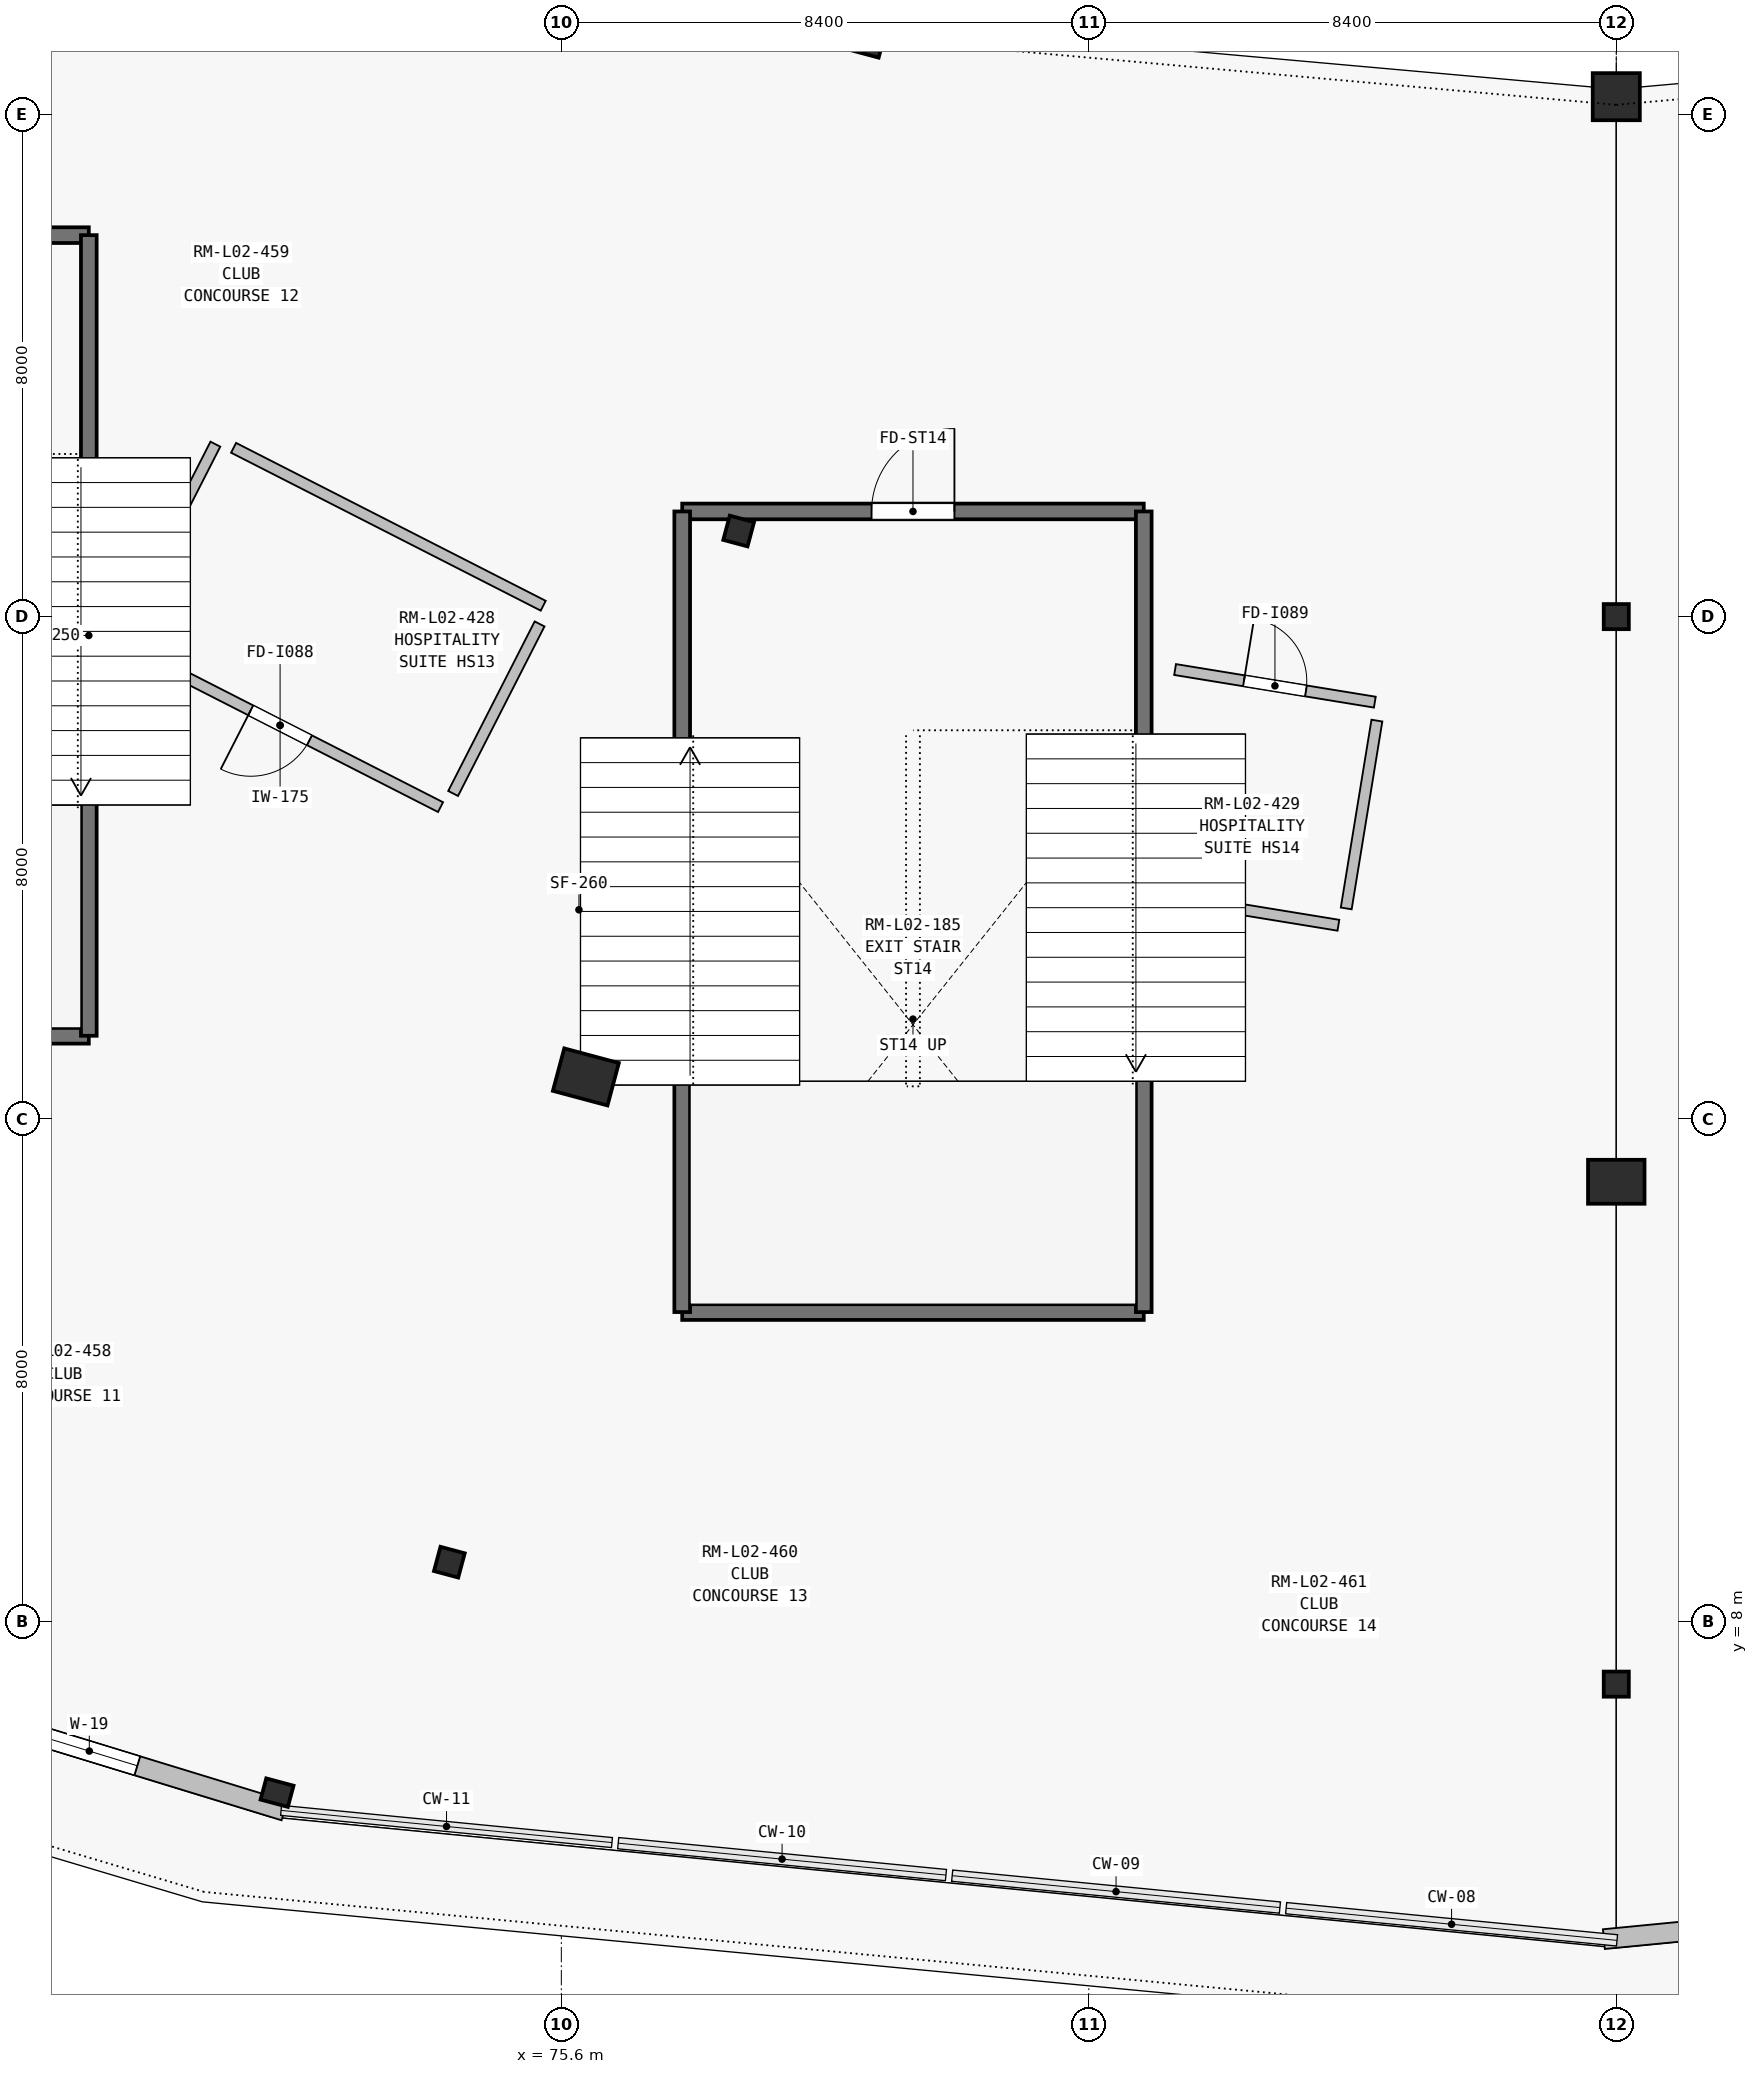
"""IFC4 building model, lengths in metres.
Left out: names, types, materials, properties, quantities, classifications, styles, units other than length and angle.
Written with IfcOpenShell. Run it as: python <this file> out.ifc"""

import sys

from ifc_helpers import new_model, si_unit, direction, frame, frame_2d, origin, origin_2d, place, context, subcontext, project, spatial, rectangle, i_section, extrude, element, fill, save


model = new_model("IFC4")
c1 = context("Model", 3, precision=1e-05, world=origin(), true_north=direction((0.0, 1.0)))
c2 = subcontext(c1, "Body", "Model", "MODEL_VIEW")
j1 = project(units=[si_unit("LENGTHUNIT", "METRE"), si_unit("PLANEANGLEUNIT", "RADIAN")], contexts=[c1])
p1 = place(None, origin())
s1 = spatial("IfcSite", under=j1, at=p1, CompositionType="ELEMENT")
p2 = place(p1, origin())
s2 = spatial("IfcBuilding", under=s1, at=p2, CompositionType="ELEMENT")
p3 = place(p2, frame((0.0, 0.0, 9.9)))
s3 = spatial("IfcBuildingStorey", under=s2, at=p3, CompositionType="ELEMENT", Elevation=9.9)
for number, where, z_axis, x_axis in (
    (1, (78.424, 25.363, 0.0), (0.0, 0.0, 1.0), (-0.259, -0.966, 0.0)),
    (2, (92.4, 24.0, 0.0), (0.0, 0.0, 1.0), (0.0, -1.0, 0.0)),
):
    element("IfcColumn", number, at=place(p3, frame(where, z_axis=z_axis, x_axis=x_axis)), inside=s3, PredefinedType="COLUMN", context=c2, shape_type="SweptSolid", body=[
        extrude(i_section(OverallWidth=0.4, OverallDepth=0.4, WebThickness=0.018, FlangeThickness=0.032, at=origin_2d()), origin(), (0.0, 0.0, 1.0), 4.5),
    ])
p4 = place(p3, frame((80.388, 33.361, 0.0), z_axis=(0.0, 0.0, 1.0), x_axis=(-0.258819045103, -0.965925826289, 0.0)))
e3 = element("IfcColumn", 3, at=p4, inside=s3, PredefinedType="COLUMN", context=c2, shape_type="SweptSolid", body=[
    extrude(rectangle(XDim=0.75, YDim=0.75, at=origin_2d()), origin(), (0.0, 0.0, 1.0), 3.553),
])
p5 = place(p3, frame((92.4, 32.28, 0.0), z_axis=(0.0, 0.0, 1.0), x_axis=(0.0, -1.0, 0.0)))
e4 = element("IfcColumn", 4, at=p5, inside=s3, PredefinedType="COLUMN", context=c2, shape_type="SweptSolid", body=[
    extrude(rectangle(XDim=0.75, YDim=0.75, at=origin_2d()), origin(), (0.0, 0.0, 1.0), 3.554),
])
for number, where, z_axis, x_axis in (
    (5, (75.991, 16.67, 0.0), (0.0, 0.0, 1.0), (-0.259, -0.966, 0.0)),
    (6, (92.4, 15.0, 0.0), (0.0, 0.0, 1.0), (0.0, -1.0, 0.0)),
):
    element("IfcColumn", number, at=place(p3, frame(where, z_axis=z_axis, x_axis=x_axis)), inside=s3, PredefinedType="COLUMN", context=c2, shape_type="SweptSolid", body=[
        extrude(rectangle(XDim=0.7, YDim=0.9, at=origin_2d()), origin(), (0.0, 0.0, 1.0), 4.5),
    ])
for number, where, z_axis, x_axis in (
    (7, (73.817, 8.942, 0.0), (0.0, 0.0, 1.0), (-0.259, -0.966, 0.0)),
    (8, (92.4, 7.0, 0.0), (0.0, 0.0, 1.0), (0.0, -1.0, 0.0)),
):
    element("IfcColumn", number, at=place(p3, frame(where, z_axis=z_axis, x_axis=x_axis)), inside=s3, PredefinedType="COLUMN", context=c2, shape_type="SweptSolid", body=[
        extrude(i_section(OverallWidth=0.4, OverallDepth=0.4, WebThickness=0.016, FlangeThickness=0.028, at=origin_2d()), origin(), (0.0, 0.0, 1.0), 4.5),
    ])
p6 = place(p3, frame((71.073, 5.272, 0.0), z_axis=(0.0, 0.0, 1.0), x_axis=(-0.258819045103, -0.965925826289, 0.0)))
e9 = element("IfcColumn", 9, at=p6, inside=s3, PredefinedType="PILASTER", context=c2, shape_type="SweptSolid", body=[
    extrude(rectangle(XDim=0.35, YDim=0.45, at=origin_2d()), origin(), (0.0, 0.0, 1.0), 5.45),
])
p7 = place(p3, frame((113.997, 5.06, 0.0), z_axis=(0.0, 0.0, 1.0), x_axis=(-0.995299462798, -0.096845130773, 0.0)))
e10 = element("IfcWall", 10, at=p7, inside=s3, PredefinedType="SOLIDWALL", context=c2, shape_type="SweptSolid", body=[
    extrude(rectangle(XDim=21.897, YDim=0.315, at=frame_2d((10.948, 0.0))), origin(), (0.0, 0.0, 1.0), 4.265),
])
p8 = place(p7, frame((1.596, 0.0, 0.0)))
e11 = element("IfcOpeningElement", 11, at=p8, cuts=e10, PredefinedType="OPENING", context=c2, shape_type="SweptSolid", body=[
    extrude(rectangle(XDim=1.95, YDim=2.35, at=frame_2d((0.975, 1.175))), frame((0.0, 0.167, 0.0), z_axis=(0.0, -1.0, 0.0), x_axis=(1.0, 0.0, 0.0)), (0.0, 0.0, 1.0), 0.335),
])
p9 = place(p7, frame((7.375, 0.0, 0.75)))
e12 = element("IfcOpeningElement", 12, at=p9, cuts=e10, PredefinedType="OPENING", context=c2, shape_type="SweptSolid", body=[
    extrude(rectangle(XDim=0.95, YDim=2.2, at=frame_2d((0.475, 1.1))), frame((0.0, 0.167, 0.0), z_axis=(0.0, -1.0, 0.0), x_axis=(1.0, 0.0, 0.0)), (0.0, 0.0, 1.0), 0.335),
])
p10 = place(p7, frame((11.65, 0.0, 0.9)))
e13 = element("IfcOpeningElement", 13, at=p10, cuts=e10, PredefinedType="OPENING", context=c2, shape_type="SweptSolid", body=[
    extrude(rectangle(XDim=1.6, YDim=1.45, at=frame_2d((0.8, 0.725))), frame((0.0, 0.167, 0.0), z_axis=(0.0, -1.0, 0.0), x_axis=(1.0, 0.0, 0.0)), (0.0, 0.0, 1.0), 0.335),
])
p11 = place(p7, frame((16.15, 0.0, 0.75)))
e14 = element("IfcOpeningElement", 14, at=p11, cuts=e10, PredefinedType="OPENING", context=c2, shape_type="SweptSolid", body=[
    extrude(rectangle(XDim=1.8, YDim=2.4, at=frame_2d((0.9, 1.2))), frame((0.0, 0.167, 0.0), z_axis=(0.0, -1.0, 0.0), x_axis=(1.0, 0.0, 0.0)), (0.0, 0.0, 1.0), 0.335),
])
p12 = place(p3, frame((71.191, 4.982, 0.0), z_axis=(0.0, 0.0, 1.0), x_axis=(-0.956190176803, 0.292746213956, 0.0)))
e15 = element("IfcWall", 15, at=p12, inside=s3, PredefinedType="SOLIDWALL", context=c2, shape_type="SweptSolid", body=[
    extrude(rectangle(XDim=21.25, YDim=0.315, at=frame_2d((10.625, 0.0))), origin(), (0.0, 0.0, 1.0), 4.265),
])
p13 = place(p12, frame((2.45, 0.0, 0.9)))
e16 = element("IfcOpeningElement", 16, at=p13, cuts=e15, PredefinedType="OPENING", context=c2, shape_type="SweptSolid", body=[
    extrude(rectangle(XDim=1.6, YDim=1.45, at=frame_2d((0.8, 0.725))), frame((0.0, 0.167, 0.0), z_axis=(0.0, -1.0, 0.0), x_axis=(1.0, 0.0, 0.0)), (0.0, 0.0, 1.0), 0.335),
])
p14 = place(p12, frame((6.95, 0.0, 0.75)))
e17 = element("IfcOpeningElement", 17, at=p14, cuts=e15, PredefinedType="OPENING", context=c2, shape_type="SweptSolid", body=[
    extrude(rectangle(XDim=1.8, YDim=2.4, at=frame_2d((0.9, 1.2))), frame((0.0, 0.167, 0.0), z_axis=(0.0, -1.0, 0.0), x_axis=(1.0, 0.0, 0.0)), (0.0, 0.0, 1.0), 0.335),
])
p15 = place(p12, frame((11.7, 0.0, 0.75)))
e18 = element("IfcOpeningElement", 18, at=p15, cuts=e15, PredefinedType="OPENING", context=c2, shape_type="SweptSolid", body=[
    extrude(rectangle(XDim=1.5, YDim=2.3, at=frame_2d((0.75, 1.15))), frame((0.0, 0.167, 0.0), z_axis=(0.0, -1.0, 0.0), x_axis=(1.0, 0.0, 0.0)), (0.0, 0.0, 1.0), 0.335),
])
p16 = place(p12, frame((16.45, 0.0, 0.75)))
e19 = element("IfcOpeningElement", 19, at=p16, cuts=e15, PredefinedType="OPENING", context=c2, shape_type="SweptSolid", body=[
    extrude(rectangle(XDim=1.2, YDim=2.2, at=frame_2d((0.6, 1.1))), frame((0.0, 0.167, 0.0), z_axis=(0.0, -1.0, 0.0), x_axis=(1.0, 0.0, 0.0)), (0.0, 0.0, 1.0), 0.335),
])
p17 = place(p3, frame((60.725, 17.325, 0.0), z_axis=(0.0, 0.0, 1.0), x_axis=(1.0, 0.0, 0.0)))
e20 = element("IfcWall", 20, at=p17, inside=s3, PredefinedType="SHEAR", context=c2, shape_type="SweptSolid", body=[
    extrude(rectangle(XDim=7.35, YDim=0.25, at=frame_2d((3.675, 0.0))), origin(), (0.0, 0.0, 1.0), 4.5),
])
p18 = place(p3, frame((60.725, 30.075, 0.0), z_axis=(0.0, 0.0, 1.0), x_axis=(1.0, 0.0, 0.0)))
e21 = element("IfcWall", 21, at=p18, inside=s3, PredefinedType="SHEAR", context=c2, shape_type="SweptSolid", body=[
    extrude(rectangle(XDim=7.35, YDim=0.25, at=frame_2d((3.675, 0.0))), origin(), (0.0, 0.0, 1.0), 4.5),
])
p19 = place(p18, frame((2.975, 0.0, 0.0)))
e22 = element("IfcOpeningElement", 22, at=p19, cuts=e21, PredefinedType="OPENING", context=c2, shape_type="SweptSolid", body=[
    extrude(rectangle(XDim=1.4, YDim=2.2, at=frame_2d((0.7, 1.1))), frame((0.0, 0.135, 0.0), z_axis=(0.0, -1.0, 0.0), x_axis=(1.0, 0.0, 0.0)), (0.0, 0.0, 1.0), 0.27),
])
p20 = place(p3, frame((68.075, 17.325, 0.0), z_axis=(0.0, 0.0, 1.0), x_axis=(0.0, 1.0, 0.0)))
e23 = element("IfcWall", 23, at=p20, inside=s3, PredefinedType="SHEAR", context=c2, shape_type="SweptSolid", body=[
    extrude(rectangle(XDim=12.75, YDim=0.25, at=frame_2d((6.375, 0.0))), origin(), (0.0, 0.0, 1.0), 4.5),
])
p21 = place(p3, frame((77.525, 12.925, 0.0), z_axis=(0.0, 0.0, 1.0), x_axis=(1.0, 0.0, 0.0)))
e24 = element("IfcWall", 24, at=p21, inside=s3, PredefinedType="SHEAR", context=c2, shape_type="SweptSolid", body=[
    extrude(rectangle(XDim=7.35, YDim=0.25, at=frame_2d((3.675, 0.0))), origin(), (0.0, 0.0, 1.0), 4.5),
])
p22 = place(p3, frame((77.525, 25.675, 0.0), z_axis=(0.0, 0.0, 1.0), x_axis=(1.0, 0.0, 0.0)))
e25 = element("IfcWall", 25, at=p22, inside=s3, PredefinedType="SHEAR", context=c2, shape_type="SweptSolid", body=[
    extrude(rectangle(XDim=7.35, YDim=0.25, at=frame_2d((3.675, 0.0))), origin(), (0.0, 0.0, 1.0), 4.5),
])
p23 = place(p22, frame((3.015, 0.0, 0.0)))
e26 = element("IfcOpeningElement", 26, at=p23, cuts=e25, PredefinedType="OPENING", context=c2, shape_type="SweptSolid", body=[
    extrude(rectangle(XDim=1.32, YDim=2.2, at=frame_2d((0.66, 1.1))), frame((0.0, 0.135, 0.0), z_axis=(0.0, -1.0, 0.0), x_axis=(1.0, 0.0, 0.0)), (0.0, 0.0, 1.0), 0.27),
])
for number, where, z_axis, x_axis in (
    (27, (77.525, 12.925, 0.0), (0.0, 0.0, 1.0), (0.0, 1.0, 0.0)),
    (28, (84.875, 12.925, 0.0), (0.0, 0.0, 1.0), (0.0, 1.0, 0.0)),
):
    element("IfcWall", number, at=place(p3, frame(where, z_axis=z_axis, x_axis=x_axis)), inside=s3, PredefinedType="SHEAR", context=c2, shape_type="SweptSolid", body=[
        extrude(rectangle(XDim=12.75, YDim=0.25, at=frame_2d((6.375, 0.0))), origin(), (0.0, 0.0, 1.0), 4.5),
    ])
p24 = place(p3, frame((73.676, 20.966, 0.0), z_axis=(0.0, 0.0, 1.0), x_axis=(-0.890831838742, 0.454333176297, 0.0)))
e29 = element("IfcWall", 29, at=p24, inside=s3, PredefinedType="PARTITIONING", context=c2, shape_type="SweptSolid", body=[
    extrude(rectangle(XDim=5.736, YDim=0.175, at=frame_2d((2.868, 0.0))), origin(), (0.0, 0.0, 1.0), 4.22),
])
p25 = place(p24, frame((2.343, 0.0, 0.0)))
e30 = element("IfcOpeningElement", 30, at=p25, cuts=e29, PredefinedType="OPENING", context=c2, shape_type="SweptSolid", body=[
    extrude(rectangle(XDim=1.05, YDim=2.25, at=frame_2d((0.525, 1.125))), frame((0.0, 0.097, 0.0), z_axis=(0.0, -1.0, 0.0), x_axis=(1.0, 0.0, 0.0)), (0.0, 0.0, 1.0), 0.195),
])
p26 = place(p3, frame((68.62, 23.863, 0.0), z_axis=(0.0, 0.0, 1.0), x_axis=(0.454320096684, 0.890838509354, 0.0)))
e31 = element("IfcWall", 31, at=p26, inside=s3, PredefinedType="PARTITIONING", context=c2, shape_type="SweptSolid", body=[
    extrude(rectangle(XDim=3.237, YDim=0.175, at=frame_2d((1.618, 0.0))), origin(), (0.0, 0.0, 1.0), 4.22),
])
p27 = place(p3, frame((70.381, 26.688, 0.0), z_axis=(0.0, 0.0, 1.0), x_axis=(0.890825995052, -0.454344634105, 0.0)))
e32 = element("IfcWall", 32, at=p27, inside=s3, PredefinedType="PARTITIONING", context=c2, shape_type="SweptSolid", body=[
    extrude(rectangle(XDim=5.535, YDim=0.175, at=frame_2d((2.768, 0.0))), origin(), (0.0, 0.0, 1.0), 4.22),
])
p28 = place(p3, frame((75.254, 23.883, 0.0), z_axis=(0.0, 0.0, 1.0), x_axis=(-0.454385541569, -0.890805129988, 0.0)))
e33 = element("IfcWall", 33, at=p28, inside=s3, PredefinedType="PARTITIONING", context=c2, shape_type="SweptSolid", body=[
    extrude(rectangle(XDim=3.03, YDim=0.175, at=frame_2d((1.515, 0.0))), origin(), (0.0, 0.0, 1.0), 4.22),
])
p29 = place(p3, frame((87.975, 19.085, 0.0), z_axis=(0.0, 0.0, 1.0), x_axis=(-0.986934384221, 0.161122690026, 0.0)))
e34 = element("IfcWall", 34, at=p29, inside=s3, PredefinedType="PARTITIONING", context=c2, shape_type="SweptSolid", body=[
    extrude(rectangle(XDim=2.635, YDim=0.175, at=frame_2d((1.317, 0.0))), origin(), (0.0, 0.0, 1.0), 4.22),
])
p30 = place(p3, frame((85.374, 23.157, 0.0), z_axis=(0.0, 0.0, 1.0), x_axis=(0.986933126632, -0.161130393026, 0.0)))
e35 = element("IfcWall", 35, at=p30, inside=s3, PredefinedType="PARTITIONING", context=c2, shape_type="SweptSolid", body=[
    extrude(rectangle(XDim=3.223, YDim=0.175, at=frame_2d((1.611, 0.0))), origin(), (0.0, 0.0, 1.0), 4.22),
])
p31 = place(p30, frame((1.111, 0.0, 0.0)))
e36 = element("IfcOpeningElement", 36, at=p31, cuts=e35, PredefinedType="OPENING", context=c2, shape_type="SweptSolid", body=[
    extrude(rectangle(XDim=1.0, YDim=2.2, at=frame_2d((0.5, 1.1))), frame((0.0, 0.097, 0.0), z_axis=(0.0, -1.0, 0.0), x_axis=(1.0, 0.0, 0.0)), (0.0, 0.0, 1.0), 0.195),
])
p32 = place(p3, frame((88.588, 22.344, 0.0), z_axis=(0.0, 0.0, 1.0), x_axis=(-0.161131898902, -0.986932880776, 0.0)))
e37 = element("IfcWall", 37, at=p32, inside=s3, PredefinedType="PARTITIONING", context=c2, shape_type="SweptSolid", body=[
    extrude(rectangle(XDim=3.03, YDim=0.175, at=frame_2d((1.515, 0.0))), origin(), (0.0, 0.0, 1.0), 4.22),
])
p33 = place(p13, origin())
e38 = element("IfcWindow", 38, at=p33, inside=s3, PartitioningType="SINGLE_PANEL", PredefinedType="WINDOW", context=c2, shape_type="SweptSolid", body=[
    extrude(rectangle(XDim=1.6, YDim=1.45, at=frame_2d((0.8, 0.725))), frame((0.0, 0.03, 0.0), z_axis=(0.0, -1.0, 0.0), x_axis=(1.0, 0.0, 0.0)), (0.0, 0.0, 1.0), 0.06),
])
fill(e16, e38)
p34 = place(p23, origin())
e39 = element("IfcDoor", 39, at=p34, inside=s3, OperationType="SINGLE_SWING_RIGHT", PredefinedType="DOOR", context=c2, shape_type="SweptSolid", body=[
    extrude(rectangle(XDim=1.32, YDim=2.2, at=frame_2d((0.66, 1.1))), frame((0.0, 0.025, 0.0), z_axis=(0.0, -1.0, 0.0), x_axis=(1.0, 0.0, 0.0)), (0.0, 0.0, 1.0), 0.05),
])
fill(e26, e39)
p35 = place(p25, origin())
e40 = element("IfcDoor", 40, at=p35, inside=s3, OperationType="SINGLE_SWING_RIGHT", PredefinedType="DOOR", context=c2, shape_type="SweptSolid", body=[
    extrude(rectangle(XDim=1.05, YDim=2.25, at=frame_2d((0.525, 1.125))), frame((0.0, 0.025, 0.0), z_axis=(0.0, -1.0, 0.0), x_axis=(1.0, 0.0, 0.0)), (0.0, 0.0, 1.0), 0.05),
])
fill(e30, e40)
p36 = place(p31, origin())
e41 = element("IfcDoor", 41, at=p36, inside=s3, OperationType="SINGLE_SWING_LEFT", PredefinedType="DOOR", context=c2, shape_type="SweptSolid", body=[
    extrude(rectangle(XDim=1.0, YDim=2.2, at=frame_2d((0.5, 1.1))), frame((0.0, 0.025, 0.0), z_axis=(0.0, -1.0, 0.0), x_axis=(1.0, 0.0, 0.0)), (0.0, 0.0, 1.0), 0.05),
])
fill(e36, e41)
save(model, sys.argv[1])
